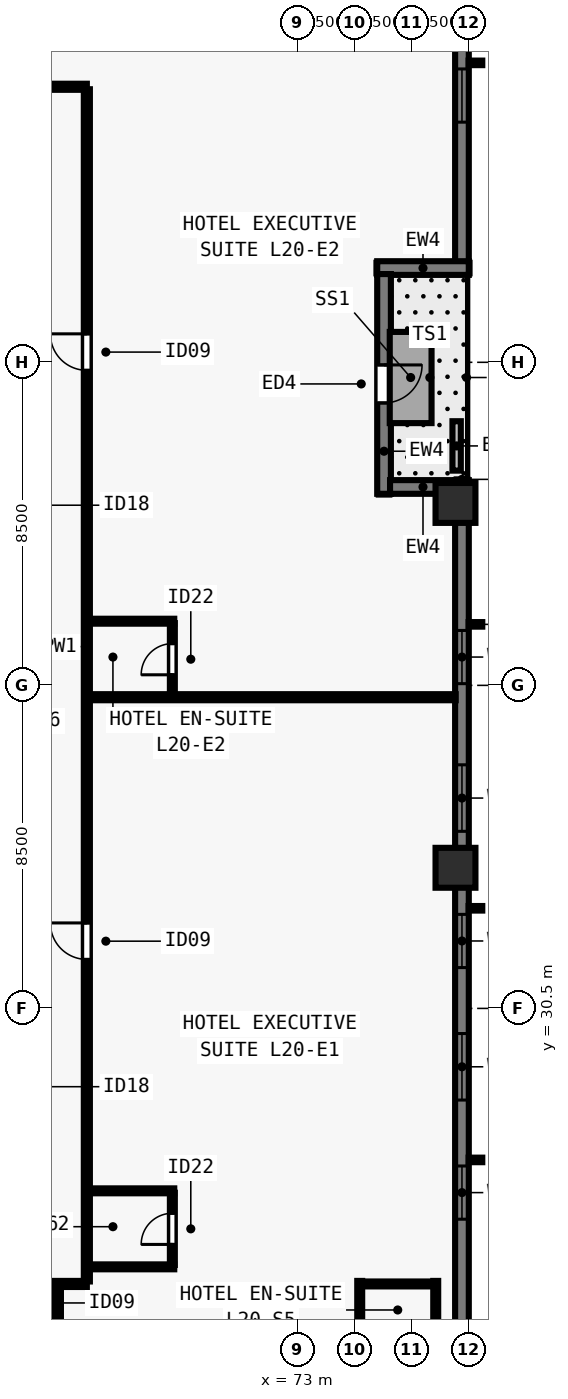
"""IFC4 building model, lengths in metres.
Left out: names, types, materials, properties, quantities, classifications, styles, units other than length and angle.
Written with IfcOpenShell. Run it as: python <this file> out.ifc"""

import sys

from ifc_helpers import new_model, si_unit, direction, frame, frame_2d, origin, origin_2d, place, context, subcontext, project, spatial, rectangle, extrude, element, fill, save


model = new_model("IFC4")
c1 = context("Model", 3, precision=1e-05, world=origin(), true_north=direction((0.0, 1.0)))
c2 = subcontext(c1, "Body", "Model", "MODEL_VIEW")
j1 = project(units=[si_unit("LENGTHUNIT", "METRE"), si_unit("PLANEANGLEUNIT", "RADIAN")], contexts=[c1])
p1 = place(None, origin())
s1 = spatial("IfcSite", under=j1, at=p1, CompositionType="ELEMENT")
p2 = place(p1, origin())
s2 = spatial("IfcBuilding", under=s1, at=p2, CompositionType="ELEMENT")
p3 = place(p2, frame((0.0, 0.0, 76.0)))
s3 = spatial("IfcBuildingStorey", under=s2, at=p3, CompositionType="ELEMENT", Elevation=76.0)
for number, where, z_axis, x_axis in (
    (1, (77.15, 34.2, 0.0), (0.0, 0.0, 1.0), (0.0, 1.0, 0.0)),
    (2, (77.15, 43.8, 0.0), (0.0, 0.0, 1.0), (0.0, 1.0, 0.0)),
):
    element("IfcColumn", number, at=place(p3, frame(where, z_axis=z_axis, x_axis=x_axis)), inside=s3, PredefinedType="COLUMN", context=c2, shape_type="SweptSolid", body=[
        extrude(rectangle(XDim=1.05, YDim=1.05, at=origin_2d()), origin(), (0.0, 0.0, 1.0), 3.5),
    ])
p4 = place(p3, frame((77.32, 44.4, 0.0), z_axis=(0.0, 0.0, 1.0), x_axis=(0.0, -1.0, 0.0)))
e3 = element("IfcWall", 3, at=p4, inside=s3, PredefinedType="SOLIDWALL", context=c2, shape_type="SweptSolid", body=[
    extrude(rectangle(XDim=27.562, YDim=0.36, at=frame_2d((13.781, 0.0))), origin(), (0.0, 0.0, 1.0), 3.28),
])
p5 = place(p4, frame((3.955, 0.0, 0.8)))
e4 = element("IfcOpeningElement", 4, at=p5, cuts=e3, PredefinedType="OPENING", context=c2, shape_type="SweptSolid", body=[
    extrude(rectangle(XDim=1.4, YDim=1.544, at=frame_2d((0.7, 0.772))), frame((0.0, 0.19, 0.0), z_axis=(0.0, -1.0, 0.0), x_axis=(1.0, 0.0, 0.0)), (0.0, 0.0, 1.0), 0.38),
])
p6 = place(p4, frame((7.49, 0.0, 0.8)))
e5 = element("IfcOpeningElement", 5, at=p6, cuts=e3, PredefinedType="OPENING", context=c2, shape_type="SweptSolid", body=[
    extrude(rectangle(XDim=1.75, YDim=1.544, at=frame_2d((0.875, 0.772))), frame((0.0, 0.19, 0.0), z_axis=(0.0, -1.0, 0.0), x_axis=(1.0, 0.0, 0.0)), (0.0, 0.0, 1.0), 0.38),
])
p7 = place(p4, frame((11.426, 0.0, 0.8)))
e6 = element("IfcOpeningElement", 6, at=p7, cuts=e3, PredefinedType="OPENING", context=c2, shape_type="SweptSolid", body=[
    extrude(rectangle(XDim=1.4, YDim=1.544, at=frame_2d((0.7, 0.772))), frame((0.0, 0.19, 0.0), z_axis=(0.0, -1.0, 0.0), x_axis=(1.0, 0.0, 0.0)), (0.0, 0.0, 1.0), 0.38),
])
p8 = place(p4, frame((14.561, 0.0, 0.8)))
e7 = element("IfcOpeningElement", 7, at=p8, cuts=e3, PredefinedType="OPENING", context=c2, shape_type="SweptSolid", body=[
    extrude(rectangle(XDim=1.75, YDim=1.544, at=frame_2d((0.875, 0.772))), frame((0.0, 0.19, 0.0), z_axis=(0.0, -1.0, 0.0), x_axis=(1.0, 0.0, 0.0)), (0.0, 0.0, 1.0), 0.38),
])
p9 = place(p4, frame((18.046, 0.0, 0.8)))
e8 = element("IfcOpeningElement", 8, at=p9, cuts=e3, PredefinedType="OPENING", context=c2, shape_type="SweptSolid", body=[
    extrude(rectangle(XDim=1.4, YDim=1.544, at=frame_2d((0.7, 0.772))), frame((0.0, 0.19, 0.0), z_axis=(0.0, -1.0, 0.0), x_axis=(1.0, 0.0, 0.0)), (0.0, 0.0, 1.0), 0.38),
])
p10 = place(p3, frame((77.32, 61.5, 0.0), z_axis=(0.0, 0.0, 1.0), x_axis=(0.0, -1.0, 0.0)))
e9 = element("IfcWall", 9, at=p10, inside=s3, PredefinedType="SOLIDWALL", context=c2, shape_type="SweptSolid", body=[
    extrude(rectangle(XDim=11.362, YDim=0.36, at=frame_2d((5.681, 0.0))), origin(), (0.0, 0.0, 1.0), 3.28),
])
p11 = place(p10, frame((6.281, 0.0, 0.8)))
e10 = element("IfcOpeningElement", 10, at=p11, cuts=e9, PredefinedType="OPENING", context=c2, shape_type="SweptSolid", body=[
    extrude(rectangle(XDim=1.4, YDim=1.544, at=frame_2d((0.7, 0.772))), frame((0.0, 0.19, 0.0), z_axis=(0.0, -1.0, 0.0), x_axis=(1.0, 0.0, 0.0)), (0.0, 0.0, 1.0), 0.38),
])
p12 = place(p3, frame((77.5, 49.98, 0.0), z_axis=(0.0, 0.0, 1.0), x_axis=(-1.0, 0.0, 0.0)))
e11 = element("IfcWall", 11, at=p12, inside=s3, PredefinedType="SOLIDWALL", context=c2, shape_type="SweptSolid", body=[
    extrude(rectangle(XDim=2.41, YDim=0.36, at=frame_2d((1.205, 0.0))), origin(), (0.0, 0.0, 1.0), 3.28),
])
p13 = place(p3, frame((75.27, 49.822, 0.0), z_axis=(0.0, 0.0, 1.0), x_axis=(0.0, -1.0, 0.0)))
e12 = element("IfcWall", 12, at=p13, inside=s3, PredefinedType="SOLIDWALL", context=c2, shape_type="SweptSolid", body=[
    extrude(rectangle(XDim=5.782, YDim=0.36, at=frame_2d((2.891, 0.0))), origin(), (0.0, 0.0, 1.0), 3.28),
])
p14 = place(p13, frame((2.391, 0.0, 0.0)))
e13 = element("IfcOpeningElement", 13, at=p14, cuts=e12, PredefinedType="OPENING", context=c2, shape_type="SweptSolid", body=[
    extrude(rectangle(XDim=1.0, YDim=2.15, at=frame_2d((0.5, 1.075))), frame((0.0, 0.19, 0.0), z_axis=(0.0, -1.0, 0.0), x_axis=(1.0, 0.0, 0.0)), (0.0, 0.0, 1.0), 0.38),
])
p15 = place(p3, frame((75.428, 44.22, 0.0), z_axis=(0.0, 0.0, 1.0), x_axis=(1.0, 0.0, 0.0)))
e14 = element("IfcWall", 14, at=p15, inside=s3, PredefinedType="SOLIDWALL", context=c2, shape_type="SweptSolid", body=[
    extrude(rectangle(XDim=1.734, YDim=0.36, at=frame_2d((0.867, 0.0))), origin(), (0.0, 0.0, 1.0), 3.28),
])
p16 = place(p3, frame((77.18, 44.65, 0.0), z_axis=(0.0, 0.0, 1.0), x_axis=(0.0, 1.0, 0.0)))
e15 = element("IfcWall", 15, at=p16, inside=s3, PredefinedType="PARAPET", context=c2, shape_type="SweptSolid", body=[
    extrude(rectangle(XDim=1.3, YDim=0.22, at=frame_2d((0.65, 0.0))), origin(), (0.0, 0.0, 1.0), 0.55),
])
p17 = place(p3, frame((36.55, 23.25, 0.0), z_axis=(0.0, 0.0, 1.0), x_axis=(1.0, 0.0, 0.0)))
e16 = element("IfcWall", 16, at=p17, inside=s3, PredefinedType="PARTITIONING", context=c2, shape_type="SweptSolid", body=[
    extrude(rectangle(XDim=30.9, YDim=0.16, at=frame_2d((15.45, 0.0))), origin(), (0.0, 0.0, 1.0), 3.28),
])
p18 = place(p17, frame((1.13, 0.0, 0.0)))
e17 = element("IfcOpeningElement", 17, at=p18, cuts=e16, PredefinedType="OPENING", context=c2, shape_type="SweptSolid", body=[
    extrude(rectangle(XDim=0.96, YDim=2.15, at=frame_2d((0.48, 1.075))), frame((0.0, 0.09, 0.0), z_axis=(0.0, -1.0, 0.0), x_axis=(1.0, 0.0, 0.0)), (0.0, 0.0, 1.0), 0.18),
])
p19 = place(p17, frame((6.093, 0.0, 0.0)))
e18 = element("IfcOpeningElement", 18, at=p19, cuts=e16, PredefinedType="OPENING", context=c2, shape_type="SweptSolid", body=[
    extrude(rectangle(XDim=0.96, YDim=2.15, at=frame_2d((0.48, 1.075))), frame((0.0, 0.09, 0.0), z_axis=(0.0, -1.0, 0.0), x_axis=(1.0, 0.0, 0.0)), (0.0, 0.0, 1.0), 0.18),
])
p20 = place(p17, frame((16.125, 0.0, 0.0)))
e19 = element("IfcOpeningElement", 19, at=p20, cuts=e16, PredefinedType="OPENING", context=c2, shape_type="SweptSolid", body=[
    extrude(rectangle(XDim=0.96, YDim=2.15, at=frame_2d((0.48, 1.075))), frame((0.0, 0.09, 0.0), z_axis=(0.0, -1.0, 0.0), x_axis=(1.0, 0.0, 0.0)), (0.0, 0.0, 1.0), 0.18),
])
p21 = place(p17, frame((26.157, 0.0, 0.0)))
e20 = element("IfcOpeningElement", 20, at=p21, cuts=e16, PredefinedType="OPENING", context=c2, shape_type="SweptSolid", body=[
    extrude(rectangle(XDim=0.96, YDim=2.15, at=frame_2d((0.48, 1.075))), frame((0.0, 0.09, 0.0), z_axis=(0.0, -1.0, 0.0), x_axis=(1.0, 0.0, 0.0)), (0.0, 0.0, 1.0), 0.18),
])
p22 = place(p17, frame((28.92, 0.0, 0.0)))
e21 = element("IfcOpeningElement", 21, at=p22, cuts=e16, PredefinedType="OPENING", context=c2, shape_type="SweptSolid", body=[
    extrude(rectangle(XDim=0.96, YDim=2.15, at=frame_2d((0.48, 1.075))), frame((0.0, 0.09, 0.0), z_axis=(0.0, -1.0, 0.0), x_axis=(1.0, 0.0, 0.0)), (0.0, 0.0, 1.0), 0.18),
])
p23 = place(p3, frame((36.55, 54.75, 0.0), z_axis=(0.0, 0.0, 1.0), x_axis=(1.0, 0.0, 0.0)))
e22 = element("IfcWall", 22, at=p23, inside=s3, PredefinedType="PARTITIONING", context=c2, shape_type="SweptSolid", body=[
    extrude(rectangle(XDim=30.9, YDim=0.16, at=frame_2d((15.45, 0.0))), origin(), (0.0, 0.0, 1.0), 3.28),
])
p24 = place(p23, frame((2.83, 0.0, 0.0)))
e23 = element("IfcOpeningElement", 23, at=p24, cuts=e22, PredefinedType="OPENING", context=c2, shape_type="SweptSolid", body=[
    extrude(rectangle(XDim=0.96, YDim=2.15, at=frame_2d((0.48, 1.075))), frame((0.0, 0.09, 0.0), z_axis=(0.0, -1.0, 0.0), x_axis=(1.0, 0.0, 0.0)), (0.0, 0.0, 1.0), 0.18),
])
p25 = place(p23, frame((15.965, 0.0, 0.0)))
e24 = element("IfcOpeningElement", 24, at=p25, cuts=e22, PredefinedType="OPENING", context=c2, shape_type="SweptSolid", body=[
    extrude(rectangle(XDim=0.96, YDim=2.15, at=frame_2d((0.48, 1.075))), frame((0.0, 0.09, 0.0), z_axis=(0.0, -1.0, 0.0), x_axis=(1.0, 0.0, 0.0)), (0.0, 0.0, 1.0), 0.18),
])
p26 = place(p23, frame((28.105, 0.0, 0.0)))
e25 = element("IfcOpeningElement", 25, at=p26, cuts=e22, PredefinedType="OPENING", context=c2, shape_type="SweptSolid", body=[
    extrude(rectangle(XDim=0.96, YDim=2.15, at=frame_2d((0.48, 1.075))), frame((0.0, 0.09, 0.0), z_axis=(0.0, -1.0, 0.0), x_axis=(1.0, 0.0, 0.0)), (0.0, 0.0, 1.0), 0.18),
])
p27 = place(p3, frame((67.45, 23.315, 0.0), z_axis=(0.0, 0.0, 1.0), x_axis=(0.0, 1.0, 0.0)))
e26 = element("IfcWall", 26, at=p27, inside=s3, PredefinedType="PARTITIONING", context=c2, shape_type="SweptSolid", body=[
    extrude(rectangle(XDim=31.37, YDim=0.16, at=frame_2d((15.685, 0.0))), origin(), (0.0, 0.0, 1.0), 3.28),
])
p28 = place(p27, frame((8.474, 0.0, 0.0)))
e27 = element("IfcOpeningElement", 27, at=p28, cuts=e26, PredefinedType="OPENING", context=c2, shape_type="SweptSolid", body=[
    extrude(rectangle(XDim=0.96, YDim=2.15, at=frame_2d((0.48, 1.075))), frame((0.0, 0.09, 0.0), z_axis=(0.0, -1.0, 0.0), x_axis=(1.0, 0.0, 0.0)), (0.0, 0.0, 1.0), 0.18),
])
p29 = place(p27, frame((23.974, 0.0, 0.0)))
e28 = element("IfcOpeningElement", 28, at=p29, cuts=e26, PredefinedType="OPENING", context=c2, shape_type="SweptSolid", body=[
    extrude(rectangle(XDim=0.96, YDim=2.15, at=frame_2d((0.48, 1.075))), frame((0.0, 0.09, 0.0), z_axis=(0.0, -1.0, 0.0), x_axis=(1.0, 0.0, 0.0)), (0.0, 0.0, 1.0), 0.18),
])
p30 = place(p3, frame((66.688, 13.845, 0.0), z_axis=(0.0, 0.0, 1.0), x_axis=(0.0, 1.0, 0.0)))
e29 = element("IfcWall", 29, at=p30, inside=s3, PredefinedType="PARTITIONING", context=c2, shape_type="SweptSolid", body=[
    extrude(rectangle(XDim=9.34, YDim=0.16, at=frame_2d((4.67, 0.0))), origin(), (0.0, 0.0, 1.0), 2.439),
])
for number, where, z_axis, x_axis in (
    (30, (76.63, 20.95, 0.0), (0.0, 0.0, 1.0), (0.0, 1.0, 0.0)),
    (31, (74.63, 20.95, 0.0), (0.0, 0.0, 1.0), (0.0, 1.0, 0.0)),
):
    element("IfcWall", number, at=place(p3, frame(where, z_axis=z_axis, x_axis=x_axis)), inside=s3, PredefinedType="PLUMBINGWALL", context=c2, shape_type="SweptSolid", body=[
        extrude(rectangle(XDim=2.38, YDim=0.13, at=frame_2d((1.19, 0.0))), origin(), (0.0, 0.0, 1.0), 3.28),
    ])
p31 = place(p3, frame((74.68, 23.25, 0.0), z_axis=(0.0, 0.0, 1.0), x_axis=(1.0, 0.0, 0.0)))
e32 = element("IfcWall", 32, at=p31, inside=s3, PredefinedType="PLUMBINGWALL", context=c2, shape_type="SweptSolid", body=[
    extrude(rectangle(XDim=1.9, YDim=0.13, at=frame_2d((0.95, 0.0))), origin(), (0.0, 0.0, 1.0), 3.28),
])
p32 = place(p3, frame((67.515, 23.7, 0.0), z_axis=(0.0, 0.0, 1.0), x_axis=(1.0, 0.0, 0.0)))
e33 = element("IfcWall", 33, at=p32, inside=s3, PredefinedType="PLUMBINGWALL", context=c2, shape_type="SweptSolid", body=[
    extrude(rectangle(XDim=2.235, YDim=0.13, at=frame_2d((1.118, 0.0))), origin(), (0.0, 0.0, 1.0), 2.849),
])
p33 = place(p3, frame((67.515, 25.7, 0.0), z_axis=(0.0, 0.0, 1.0), x_axis=(1.0, 0.0, 0.0)))
e34 = element("IfcWall", 34, at=p33, inside=s3, PredefinedType="PLUMBINGWALL", context=c2, shape_type="SweptSolid", body=[
    extrude(rectangle(XDim=2.235, YDim=0.13, at=frame_2d((1.118, 0.0))), origin(), (0.0, 0.0, 1.0), 3.28),
])
p34 = place(p3, frame((69.7, 23.75, 0.0), z_axis=(0.0, 0.0, 1.0), x_axis=(0.0, 1.0, 0.0)))
e35 = element("IfcWall", 35, at=p34, inside=s3, PredefinedType="PLUMBINGWALL", context=c2, shape_type="SweptSolid", body=[
    extrude(rectangle(XDim=1.9, YDim=0.13, at=frame_2d((0.95, 0.0))), origin(), (0.0, 0.0, 1.0), 3.28),
])
p35 = place(p34, frame((0.54, 0.0, 0.0)))
e36 = element("IfcOpeningElement", 36, at=p35, cuts=e35, PredefinedType="OPENING", context=c2, shape_type="SweptSolid", body=[
    extrude(rectangle(XDim=0.82, YDim=2.1, at=frame_2d((0.41, 1.05))), frame((0.0, 0.075, 0.0), z_axis=(0.0, -1.0, 0.0), x_axis=(1.0, 0.0, 0.0)), (0.0, 0.0, 1.0), 0.15),
])
p36 = place(p3, frame((67.515, 38.688, 0.0), z_axis=(0.0, 0.0, 1.0), x_axis=(1.0, 0.0, 0.0)))
e37 = element("IfcWall", 37, at=p36, inside=s3, PredefinedType="PARTITIONING", context=c2, shape_type="SweptSolid", body=[
    extrude(rectangle(XDim=9.64, YDim=0.16, at=frame_2d((4.82, 0.0))), origin(), (0.0, 0.0, 1.0), 3.28),
])
p37 = place(p3, frame((67.515, 40.688, 0.0), z_axis=(0.0, 0.0, 1.0), x_axis=(1.0, 0.0, 0.0)))
e38 = element("IfcWall", 38, at=p37, inside=s3, PredefinedType="PLUMBINGWALL", context=c2, shape_type="SweptSolid", body=[
    extrude(rectangle(XDim=2.235, YDim=0.13, at=frame_2d((1.118, 0.0))), origin(), (0.0, 0.0, 1.0), 3.28),
])
p38 = place(p3, frame((69.7, 38.753, 0.0), z_axis=(0.0, 0.0, 1.0), x_axis=(0.0, 1.0, 0.0)))
e39 = element("IfcWall", 39, at=p38, inside=s3, PredefinedType="PLUMBINGWALL", context=c2, shape_type="SweptSolid", body=[
    extrude(rectangle(XDim=1.885, YDim=0.13, at=frame_2d((0.942, 0.0))), origin(), (0.0, 0.0, 1.0), 3.28),
])
p39 = place(p38, frame((0.525, 0.0, 0.0)))
e40 = element("IfcOpeningElement", 40, at=p39, cuts=e39, PredefinedType="OPENING", context=c2, shape_type="SweptSolid", body=[
    extrude(rectangle(XDim=0.82, YDim=2.1, at=frame_2d((0.41, 1.05))), frame((0.0, 0.075, 0.0), z_axis=(0.0, -1.0, 0.0), x_axis=(1.0, 0.0, 0.0)), (0.0, 0.0, 1.0), 0.15),
])
p40 = place(p5, origin())
e41 = element("IfcWindow", 41, at=p40, inside=s3, PartitioningType="SINGLE_PANEL", PredefinedType="WINDOW", context=c2, shape_type="SweptSolid", body=[
    extrude(rectangle(XDim=1.4, YDim=1.544, at=frame_2d((0.7, 0.772))), frame((0.0, -0.05, 0.0), z_axis=(0.0, -1.0, 0.0), x_axis=(1.0, 0.0, 0.0)), (0.0, 0.0, 1.0), 0.06),
])
fill(e4, e41)
p41 = place(p6, origin())
e42 = element("IfcWindow", 42, at=p41, inside=s3, PartitioningType="SINGLE_PANEL", PredefinedType="WINDOW", context=c2, shape_type="SweptSolid", body=[
    extrude(rectangle(XDim=1.75, YDim=1.544, at=frame_2d((0.875, 0.772))), frame((0.0, -0.05, 0.0), z_axis=(0.0, -1.0, 0.0), x_axis=(1.0, 0.0, 0.0)), (0.0, 0.0, 1.0), 0.06),
])
fill(e5, e42)
p42 = place(p7, origin())
e43 = element("IfcWindow", 43, at=p42, inside=s3, PartitioningType="SINGLE_PANEL", PredefinedType="WINDOW", context=c2, shape_type="SweptSolid", body=[
    extrude(rectangle(XDim=1.4, YDim=1.544, at=frame_2d((0.7, 0.772))), frame((0.0, -0.05, 0.0), z_axis=(0.0, -1.0, 0.0), x_axis=(1.0, 0.0, 0.0)), (0.0, 0.0, 1.0), 0.06),
])
fill(e6, e43)
p43 = place(p8, origin())
e44 = element("IfcWindow", 44, at=p43, inside=s3, PartitioningType="SINGLE_PANEL", PredefinedType="WINDOW", context=c2, shape_type="SweptSolid", body=[
    extrude(rectangle(XDim=1.75, YDim=1.544, at=frame_2d((0.875, 0.772))), frame((0.0, -0.05, 0.0), z_axis=(0.0, -1.0, 0.0), x_axis=(1.0, 0.0, 0.0)), (0.0, 0.0, 1.0), 0.06),
])
fill(e7, e44)
p44 = place(p9, origin())
e45 = element("IfcWindow", 45, at=p44, inside=s3, PartitioningType="SINGLE_PANEL", PredefinedType="WINDOW", context=c2, shape_type="SweptSolid", body=[
    extrude(rectangle(XDim=1.4, YDim=1.544, at=frame_2d((0.7, 0.772))), frame((0.0, -0.05, 0.0), z_axis=(0.0, -1.0, 0.0), x_axis=(1.0, 0.0, 0.0)), (0.0, 0.0, 1.0), 0.06),
])
fill(e8, e45)
p45 = place(p11, origin())
e46 = element("IfcWindow", 46, at=p45, inside=s3, PartitioningType="SINGLE_PANEL", PredefinedType="WINDOW", context=c2, shape_type="SweptSolid", body=[
    extrude(rectangle(XDim=1.4, YDim=1.544, at=frame_2d((0.7, 0.772))), frame((0.0, -0.05, 0.0), z_axis=(0.0, -1.0, 0.0), x_axis=(1.0, 0.0, 0.0)), (0.0, 0.0, 1.0), 0.06),
])
fill(e10, e46)
p46 = place(p14, origin())
e47 = element("IfcDoor", 47, at=p46, inside=s3, OperationType="SINGLE_SWING_LEFT", PredefinedType="DOOR", context=c2, shape_type="SweptSolid", body=[
    extrude(rectangle(XDim=1.0, YDim=2.15, at=frame_2d((0.5, 1.075))), frame((0.0, 0.025, 0.0), z_axis=(0.0, -1.0, 0.0), x_axis=(1.0, 0.0, 0.0)), (0.0, 0.0, 1.0), 0.05),
])
fill(e13, e47)
p47 = place(p35, origin())
e48 = element("IfcDoor", 48, at=p47, inside=s3, OperationType="SINGLE_SWING_LEFT", PredefinedType="DOOR", context=c2, shape_type="SweptSolid", body=[
    extrude(rectangle(XDim=0.82, YDim=2.1, at=frame_2d((0.41, 1.05))), frame((0.0, 0.025, 0.0), z_axis=(0.0, -1.0, 0.0), x_axis=(1.0, 0.0, 0.0)), (0.0, 0.0, 1.0), 0.05),
])
fill(e36, e48)
p48 = place(p28, origin())
e49 = element("IfcDoor", 49, at=p48, inside=s3, OperationType="SINGLE_SWING_RIGHT", PredefinedType="DOOR", context=c2, shape_type="SweptSolid", body=[
    extrude(rectangle(XDim=0.96, YDim=2.15, at=frame_2d((0.48, 1.075))), frame((0.0, 0.025, 0.0), z_axis=(0.0, -1.0, 0.0), x_axis=(1.0, 0.0, 0.0)), (0.0, 0.0, 1.0), 0.05),
])
fill(e27, e49)
p49 = place(p39, origin())
e50 = element("IfcDoor", 50, at=p49, inside=s3, OperationType="SINGLE_SWING_LEFT", PredefinedType="DOOR", context=c2, shape_type="SweptSolid", body=[
    extrude(rectangle(XDim=0.82, YDim=2.1, at=frame_2d((0.41, 1.05))), frame((0.0, 0.025, 0.0), z_axis=(0.0, -1.0, 0.0), x_axis=(1.0, 0.0, 0.0)), (0.0, 0.0, 1.0), 0.05),
])
fill(e40, e50)
p50 = place(p29, origin())
e51 = element("IfcDoor", 51, at=p50, inside=s3, OperationType="SINGLE_SWING_RIGHT", PredefinedType="DOOR", context=c2, shape_type="SweptSolid", body=[
    extrude(rectangle(XDim=0.96, YDim=2.15, at=frame_2d((0.48, 1.075))), frame((0.0, 0.025, 0.0), z_axis=(0.0, -1.0, 0.0), x_axis=(1.0, 0.0, 0.0)), (0.0, 0.0, 1.0), 0.05),
])
fill(e28, e51)
save(model, sys.argv[1])
